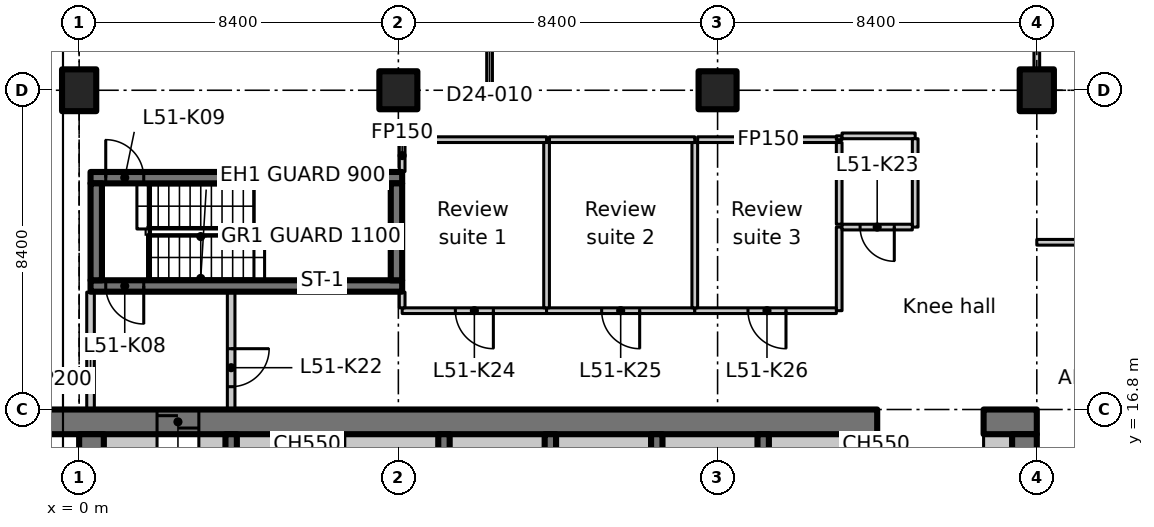
"""IFC4 building model, lengths in metres.
Left out: names, types, materials, properties, quantities, classifications, styles, units other than length and angle.
Written with IfcOpenShell. Run it as: python <this file> out.ifc"""

import sys

from ifc_helpers import new_model, si_unit, direction, frame, frame_2d, origin, origin_2d, place, context, subcontext, project, spatial, polyline, rectangle, outline, extrude, element, fill, save


model = new_model("IFC4")
c1 = context("Model", 3, precision=1e-05, world=origin(), true_north=direction((0.0, 1.0)))
c2 = subcontext(c1, "Body", "Model", "MODEL_VIEW")
j1 = project(units=[si_unit("LENGTHUNIT", "METRE"), si_unit("PLANEANGLEUNIT", "RADIAN")], contexts=[c1])
p1 = place(None, origin())
s1 = spatial("IfcSite", under=j1, at=p1, CompositionType="ELEMENT")
p2 = place(p1, origin())
s2 = spatial("IfcBuilding", under=s1, at=p2, CompositionType="ELEMENT")
p3 = place(p2, frame((0.0, 0.0, 202.8)))
s3 = spatial("IfcBuildingStorey", under=s2, at=p3, CompositionType="ELEMENT", Elevation=202.8)
p4 = place(p3, frame((0.0, 25.2, 0.0), z_axis=(0.0, 0.0, 1.0), x_axis=(1.0, 0.0, 0.0)))
e1 = element("IfcColumn", 1, at=p4, inside=s3, PredefinedType="COLUMN", context=c2, shape_type="SweptSolid", body=[
    extrude(rectangle(XDim=0.9, YDim=1.1, at=origin_2d()), origin(), (0.0, 0.0, 1.0), 3.3),
])
for number, where, z_axis, x_axis in (
    (2, (8.4, 25.2, 0.0), (0.0, 0.0, 1.0), (1.0, 0.0, 0.0)),
    (3, (16.8, 25.2, 0.0), (0.0, 0.0, 1.0), (1.0, 0.0, 0.0)),
):
    element("IfcColumn", number, at=place(p3, frame(where, z_axis=z_axis, x_axis=x_axis)), inside=s3, PredefinedType="COLUMN", context=c2, shape_type="SweptSolid", body=[
        extrude(rectangle(XDim=1.0, YDim=1.0, at=origin_2d()), origin(), (0.0, 0.0, 1.0), 3.3),
    ])
p5 = place(p3, frame((25.2, 25.2, 0.0), z_axis=(0.0, 0.0, 1.0), x_axis=(1.0, 0.0, 0.0)))
e4 = element("IfcColumn", 4, at=p5, inside=s3, PredefinedType="COLUMN", context=c2, shape_type="SweptSolid", body=[
    extrude(rectangle(XDim=0.9, YDim=1.1, at=origin_2d()), origin(), (0.0, 0.0, 1.0), 3.3),
])
p6 = place(p3, frame((-1.1, 16.475, 0.0), z_axis=(0.0, 0.0, 1.0), x_axis=(1.0, 0.0, 0.0)))
e5 = element("IfcWall", 5, at=p6, inside=s3, PredefinedType="SHEAR", context=c2, shape_type="SweptSolid", body=[
    extrude(rectangle(XDim=22.1, YDim=0.65, at=frame_2d((11.05, 0.0))), origin(), (0.0, 0.0, 1.0), 3.3),
])
p7 = place(p6, frame((3.15, 0.0, 0.0)))
e6 = element("IfcOpeningElement", 6, at=p7, cuts=e5, PredefinedType="OPENING", context=c2, shape_type="SweptSolid", body=[
    extrude(rectangle(XDim=1.1, YDim=2.3, at=frame_2d((0.55, 1.15))), frame((0.0, 0.335, 0.0), z_axis=(0.0, -1.0, 0.0), x_axis=(1.0, 0.0, 0.0)), (0.0, 0.0, 1.0), 0.67),
])
p8 = place(p3, frame((23.8, 16.475, 0.0), z_axis=(0.0, 0.0, 1.0), x_axis=(1.0, 0.0, 0.0)))
e7 = element("IfcWall", 7, at=p8, inside=s3, PredefinedType="SHEAR", context=c2, shape_type="SweptSolid", body=[
    extrude(rectangle(XDim=1.4, YDim=0.65, at=frame_2d((0.7, 0.0))), origin(), (0.0, 0.0, 1.0), 3.3),
])
p9 = place(p3, frame((0.325, 7.286, 0.0), z_axis=(0.0, 0.0, 1.0), x_axis=(0.0, 1.0, 0.0)))
e8 = element("IfcWall", 8, at=p9, inside=s3, PredefinedType="SHEAR", context=c2, shape_type="SweptSolid", body=[
    extrude(rectangle(XDim=8.864, YDim=0.65, at=frame_2d((4.432, 0.0))), origin(), (0.0, 0.0, 1.0), 3.3),
])
p10 = place(p3, frame((24.875, 12.6, 0.0), z_axis=(0.0, 0.0, 1.0), x_axis=(0.0, 1.0, 0.0)))
e9 = element("IfcWall", 9, at=p10, inside=s3, PredefinedType="SHEAR", context=c2, shape_type="SweptSolid", body=[
    extrude(rectangle(XDim=3.55, YDim=0.65, at=frame_2d((1.775, 0.0))), origin(), (0.0, 0.0, 1.0), 3.3),
])
p11 = place(p3, frame((0.65, 15.875, 0.0), z_axis=(0.0, 0.0, 1.0), x_axis=(1.0, 0.0, 0.0)))
e10 = element("IfcWall", 10, at=p11, inside=s3, PredefinedType="PARTITIONING", context=c2, shape_type="SweptSolid", body=[
    extrude(rectangle(XDim=1.4, YDim=0.55, at=frame_2d((0.7, 0.0))), origin(), (0.0, 0.0, 1.0), 3.3),
])
p12 = place(p3, frame((23.8, 15.875, 0.0), z_axis=(0.0, 0.0, 1.0), x_axis=(1.0, 0.0, 0.0)))
e11 = element("IfcWall", 11, at=p12, inside=s3, PredefinedType="PARTITIONING", context=c2, shape_type="SweptSolid", body=[
    extrude(rectangle(XDim=0.75, YDim=0.55, at=frame_2d((0.375, 0.0))), origin(), (0.0, 0.0, 1.0), 3.3),
])
for number, where, z_axis, x_axis in (
    (12, (4.0, 12.95, 0.0), (0.0, 0.0, 1.0), (0.0, 1.0, 0.0)),
    (13, (6.8, 12.95, 0.0), (0.0, 0.0, 1.0), (0.0, 1.0, 0.0)),
    (14, (9.6, 12.95, 0.0), (0.0, 0.0, 1.0), (0.0, 1.0, 0.0)),
    (15, (12.4, 12.95, 0.0), (0.0, 0.0, 1.0), (0.0, 1.0, 0.0)),
    (16, (15.2, 12.95, 0.0), (0.0, 0.0, 1.0), (0.0, 1.0, 0.0)),
    (17, (18.0, 12.95, 0.0), (0.0, 0.0, 1.0), (0.0, 1.0, 0.0)),
    (18, (20.8, 12.95, 0.0), (0.0, 0.0, 1.0), (0.0, 1.0, 0.0)),
):
    element("IfcWall", number, at=place(p3, frame(where, z_axis=z_axis, x_axis=x_axis)), inside=s3, PredefinedType="SHEAR", context=c2, shape_type="SweptSolid", body=[
        extrude(rectangle(XDim=3.2, YDim=0.3, at=frame_2d((1.6, 0.0))), origin(), (0.0, 0.0, 1.0), 3.3),
    ])
p13 = place(p3, frame((8.5, 20.05, 0.0), z_axis=(0.0, 0.0, 1.0), x_axis=(-1.0, 0.0, 0.0)))
e19 = element("IfcWall", 19, at=p13, inside=s3, PredefinedType="SHEAR", context=c2, shape_type="SweptSolid", body=[
    extrude(rectangle(XDim=8.2, YDim=0.3, at=frame_2d((4.1, 0.0))), origin(), (0.0, 0.0, 1.0), 3.3),
])
p14 = place(p13, frame((6.8, 0.0, 0.0)))
e20 = element("IfcOpeningElement", 20, at=p14, cuts=e19, PredefinedType="OPENING", context=c2, shape_type="SweptSolid", body=[
    extrude(rectangle(XDim=1.0, YDim=2.1, at=frame_2d((0.5, 1.05))), frame((0.0, 0.16, 0.0), z_axis=(0.0, -1.0, 0.0), x_axis=(1.0, 0.0, 0.0)), (0.0, 0.0, 1.0), 0.32),
])
p15 = place(p3, frame((0.3, 22.9, 0.0), z_axis=(0.0, 0.0, 1.0), x_axis=(1.0, 0.0, 0.0)))
e21 = element("IfcWall", 21, at=p15, inside=s3, PredefinedType="SHEAR", context=c2, shape_type="SweptSolid", body=[
    extrude(rectangle(XDim=8.2, YDim=0.3, at=frame_2d((4.1, 0.0))), origin(), (0.0, 0.0, 1.0), 3.3),
])
p16 = place(p15, frame((0.4, 0.0, 0.0)))
e22 = element("IfcOpeningElement", 22, at=p16, cuts=e21, PredefinedType="OPENING", context=c2, shape_type="SweptSolid", body=[
    extrude(rectangle(XDim=1.0, YDim=2.1, at=frame_2d((0.5, 1.05))), frame((0.0, 0.16, 0.0), z_axis=(0.0, -1.0, 0.0), x_axis=(1.0, 0.0, 0.0)), (0.0, 0.0, 1.0), 0.32),
])
for number, where, z_axis, x_axis in (
    (23, (0.45, 20.2, 0.0), (0.0, 0.0, 1.0), (0.0, 1.0, 0.0)),
    (24, (8.35, 20.2, 0.0), (0.0, 0.0, 1.0), (0.0, 1.0, 0.0)),
):
    element("IfcWall", number, at=place(p3, frame(where, z_axis=z_axis, x_axis=x_axis)), inside=s3, PredefinedType="SHEAR", context=c2, shape_type="SweptSolid", body=[
        extrude(rectangle(XDim=2.55, YDim=0.3, at=frame_2d((1.275, 0.0))), origin(), (0.0, 0.0, 1.0), 3.3),
    ])
p17 = place(p3, frame((0.3, 16.812, 0.0), z_axis=(0.0, 0.0, 1.0), x_axis=(0.0, 1.0, 0.0)))
e25 = element("IfcWall", 25, at=p17, inside=s3, PredefinedType="PARTITIONING", context=c2, shape_type="SweptSolid", body=[
    extrude(rectangle(XDim=3.076, YDim=0.2, at=frame_2d((1.538, 0.0))), origin(), (0.0, 0.0, 1.0), 2.93),
])
p18 = place(p3, frame((4.0, 19.888, 0.0), z_axis=(0.0, 0.0, 1.0), x_axis=(0.0, -1.0, 0.0)))
e26 = element("IfcWall", 26, at=p18, inside=s3, PredefinedType="PARTITIONING", context=c2, shape_type="SweptSolid", body=[
    extrude(rectangle(XDim=3.076, YDim=0.2, at=frame_2d((1.538, 0.0))), origin(), (0.0, 0.0, 1.0), 3.3),
])
p19 = place(p18, frame((1.488, 0.0, 0.0)))
e27 = element("IfcOpeningElement", 27, at=p19, cuts=e26, PredefinedType="OPENING", context=c2, shape_type="SweptSolid", body=[
    extrude(rectangle(XDim=1.0, YDim=2.1, at=frame_2d((0.5, 1.05))), frame((0.0, 0.11, 0.0), z_axis=(0.0, -1.0, 0.0), x_axis=(1.0, 0.0, 0.0)), (0.0, 0.0, 1.0), 0.22),
])
p20 = place(p3, frame((12.3, 19.4, 0.0), z_axis=(0.0, 0.0, 1.0), x_axis=(-1.0, 0.0, 0.0)))
e28 = element("IfcWall", 28, at=p20, inside=s3, PredefinedType="PARTITIONING", context=c2, shape_type="SweptSolid", body=[
    extrude(rectangle(XDim=3.8, YDim=0.15, at=frame_2d((1.9, 0.0))), origin(), (0.0, 0.0, 1.0), 3.3),
])
p21 = place(p20, frame((1.4, 0.0, 0.0)))
e29 = element("IfcOpeningElement", 29, at=p21, cuts=e28, PredefinedType="OPENING", context=c2, shape_type="SweptSolid", body=[
    extrude(rectangle(XDim=1.0, YDim=2.1, at=frame_2d((0.5, 1.05))), frame((0.0, 0.085, 0.0), z_axis=(0.0, -1.0, 0.0), x_axis=(1.0, 0.0, 0.0)), (0.0, 0.0, 1.0), 0.17),
])
p22 = place(p3, frame((8.5, 19.475, 0.0), z_axis=(0.0, 0.0, 1.0), x_axis=(0.0, 1.0, 0.0)))
e30 = element("IfcWall", 30, at=p22, inside=s3, PredefinedType="PARTITIONING", context=c2, shape_type="SweptSolid", body=[
    extrude(rectangle(XDim=0.413, YDim=0.15, at=frame_2d((0.207, 0.0))), origin(), (0.0, 0.0, 1.0), 3.3),
])
p23 = place(p3, frame((8.5, 23.062, 0.0), z_axis=(0.0, 0.0, 1.0), x_axis=(0.0, 1.0, 0.0)))
e31 = element("IfcWall", 31, at=p23, inside=s3, PredefinedType="PARTITIONING", context=c2, shape_type="SweptSolid", body=[
    extrude(rectangle(XDim=0.838, YDim=0.15, at=frame_2d((0.419, 0.0))), origin(), (0.0, 0.0, 1.0), 3.3),
])
p24 = place(p3, frame((8.575, 23.9, 0.0), z_axis=(0.0, 0.0, 1.0), x_axis=(1.0, 0.0, 0.0)))
e32 = element("IfcWall", 32, at=p24, inside=s3, PredefinedType="PARTITIONING", context=c2, shape_type="SweptSolid", body=[
    extrude(rectangle(XDim=3.725, YDim=0.15, at=frame_2d((1.863, 0.0))), origin(), (0.0, 0.0, 1.0), 3.3),
])
p25 = place(p3, frame((16.2, 19.4, 0.0), z_axis=(0.0, 0.0, 1.0), x_axis=(-1.0, 0.0, 0.0)))
e33 = element("IfcWall", 33, at=p25, inside=s3, PredefinedType="PARTITIONING", context=c2, shape_type="SweptSolid", body=[
    extrude(rectangle(XDim=3.9, YDim=0.15, at=frame_2d((1.95, 0.0))), origin(), (0.0, 0.0, 1.0), 3.3),
])
p26 = place(p25, frame((1.45, 0.0, 0.0)))
e34 = element("IfcOpeningElement", 34, at=p26, cuts=e33, PredefinedType="OPENING", context=c2, shape_type="SweptSolid", body=[
    extrude(rectangle(XDim=1.0, YDim=2.1, at=frame_2d((0.5, 1.05))), frame((0.0, 0.085, 0.0), z_axis=(0.0, -1.0, 0.0), x_axis=(1.0, 0.0, 0.0)), (0.0, 0.0, 1.0), 0.17),
])
p27 = place(p3, frame((12.3, 23.825, 0.0), z_axis=(0.0, 0.0, 1.0), x_axis=(0.0, -1.0, 0.0)))
e35 = element("IfcWall", 35, at=p27, inside=s3, PredefinedType="PARTITIONING", context=c2, shape_type="SweptSolid", body=[
    extrude(rectangle(XDim=4.35, YDim=0.15, at=frame_2d((2.175, 0.0))), origin(), (0.0, 0.0, 1.0), 3.3),
])
p28 = place(p3, frame((12.375, 23.9, 0.0), z_axis=(0.0, 0.0, 1.0), x_axis=(1.0, 0.0, 0.0)))
e36 = element("IfcWall", 36, at=p28, inside=s3, PredefinedType="PARTITIONING", context=c2, shape_type="SweptSolid", body=[
    extrude(rectangle(XDim=3.825, YDim=0.15, at=frame_2d((1.913, 0.0))), origin(), (0.0, 0.0, 1.0), 3.3),
])
p29 = place(p3, frame((20.0, 21.6, 0.0), z_axis=(0.0, 0.0, 1.0), x_axis=(0.0, -1.0, 0.0)))
e37 = element("IfcWall", 37, at=p29, inside=s3, PredefinedType="PARTITIONING", context=c2, shape_type="SweptSolid", body=[
    extrude(rectangle(XDim=2.2, YDim=0.15, at=frame_2d((1.1, 0.0))), origin(), (0.0, 0.0, 1.0), 3.3),
])
p30 = place(p3, frame((19.925, 19.4, 0.0), z_axis=(0.0, 0.0, 1.0), x_axis=(-1.0, 0.0, 0.0)))
e38 = element("IfcWall", 38, at=p30, inside=s3, PredefinedType="PARTITIONING", context=c2, shape_type="SweptSolid", body=[
    extrude(rectangle(XDim=3.725, YDim=0.15, at=frame_2d((1.863, 0.0))), origin(), (0.0, 0.0, 1.0), 3.3),
])
p31 = place(p30, frame((1.325, 0.0, 0.0)))
e39 = element("IfcOpeningElement", 39, at=p31, cuts=e38, PredefinedType="OPENING", context=c2, shape_type="SweptSolid", body=[
    extrude(rectangle(XDim=1.0, YDim=2.1, at=frame_2d((0.5, 1.05))), frame((0.0, 0.085, 0.0), z_axis=(0.0, -1.0, 0.0), x_axis=(1.0, 0.0, 0.0)), (0.0, 0.0, 1.0), 0.17),
])
p32 = place(p3, frame((16.2, 23.825, 0.0), z_axis=(0.0, 0.0, 1.0), x_axis=(0.0, -1.0, 0.0)))
e40 = element("IfcWall", 40, at=p32, inside=s3, PredefinedType="PARTITIONING", context=c2, shape_type="SweptSolid", body=[
    extrude(rectangle(XDim=4.35, YDim=0.15, at=frame_2d((2.175, 0.0))), origin(), (0.0, 0.0, 1.0), 3.3),
])
p33 = place(p3, frame((16.275, 23.9, 0.0), z_axis=(0.0, 0.0, 1.0), x_axis=(1.0, 0.0, 0.0)))
e41 = element("IfcWall", 41, at=p33, inside=s3, PredefinedType="PARTITIONING", context=c2, shape_type="SweptSolid", body=[
    extrude(rectangle(XDim=3.725, YDim=0.15, at=frame_2d((1.863, 0.0))), origin(), (0.0, 0.0, 1.0), 3.3),
])
p34 = place(p3, frame((20.0, 23.9, 0.0), z_axis=(0.0, 0.0, 1.0), x_axis=(0.0, 1.0, 0.0)))
e42 = element("IfcWall", 42, at=p34, inside=s3, PredefinedType="PARTITIONING", context=c2, shape_type="SweptSolid", body=[
    extrude(rectangle(XDim=0.1, YDim=0.15, at=frame_2d((0.05, 0.0))), origin(), (0.0, 0.0, 1.0), 3.3),
])
p35 = place(p3, frame((20.075, 24.0, 0.0), z_axis=(0.0, 0.0, 1.0), x_axis=(1.0, 0.0, 0.0)))
e43 = element("IfcWall", 43, at=p35, inside=s3, PredefinedType="PARTITIONING", context=c2, shape_type="SweptSolid", body=[
    extrude(rectangle(XDim=1.925, YDim=0.15, at=frame_2d((0.962, 0.0))), origin(), (0.0, 0.0, 1.0), 3.3),
])
p36 = place(p3, frame((22.0, 23.925, 0.0), z_axis=(0.0, 0.0, 1.0), x_axis=(0.0, -1.0, 0.0)))
e44 = element("IfcWall", 44, at=p36, inside=s3, PredefinedType="PARTITIONING", context=c2, shape_type="SweptSolid", body=[
    extrude(rectangle(XDim=2.325, YDim=0.15, at=frame_2d((1.163, 0.0))), origin(), (0.0, 0.0, 1.0), 3.3),
])
p37 = place(p3, frame((21.925, 21.6, 0.0), z_axis=(0.0, 0.0, 1.0), x_axis=(-1.0, 0.0, 0.0)))
e45 = element("IfcWall", 45, at=p37, inside=s3, PredefinedType="PARTITIONING", context=c2, shape_type="SweptSolid", body=[
    extrude(rectangle(XDim=1.85, YDim=0.15, at=frame_2d((0.925, 0.0))), origin(), (0.0, 0.0, 1.0), 3.3),
])
p38 = place(p37, frame((0.475, 0.0, 0.0)))
e46 = element("IfcOpeningElement", 46, at=p38, cuts=e45, PredefinedType="OPENING", context=c2, shape_type="SweptSolid", body=[
    extrude(rectangle(XDim=0.9, YDim=2.1, at=frame_2d((0.45, 1.05))), frame((0.0, 0.085, 0.0), z_axis=(0.0, -1.0, 0.0), x_axis=(1.0, 0.0, 0.0)), (0.0, 0.0, 1.0), 0.17),
])
p39 = place(p3, frame((20.0, 21.675, 0.0), z_axis=(0.0, 0.0, 1.0), x_axis=(0.0, 1.0, 0.0)))
e47 = element("IfcWall", 47, at=p39, inside=s3, PredefinedType="PARTITIONING", context=c2, shape_type="SweptSolid", body=[
    extrude(rectangle(XDim=2.15, YDim=0.15, at=frame_2d((1.075, 0.0))), origin(), (0.0, 0.0, 1.0), 3.3),
])
p40 = place(p3, frame((3.15, 15.875, 0.0), z_axis=(0.0, 0.0, 1.0), x_axis=(1.0, 0.0, 0.0)))
e48 = element("IfcWall", 48, at=p40, inside=s3, PredefinedType="PARTITIONING", context=c2, shape_type="SweptSolid", body=[
    extrude(rectangle(XDim=0.7, YDim=0.55, at=frame_2d((0.35, 0.0))), origin(), (0.0, 0.0, 1.0), 3.3),
])
for number, where, z_axis, x_axis in (
    (49, (4.15, 15.875, 0.0), (0.0, 0.0, 1.0), (1.0, 0.0, 0.0)),
    (50, (6.95, 15.875, 0.0), (0.0, 0.0, 1.0), (1.0, 0.0, 0.0)),
    (51, (9.75, 15.875, 0.0), (0.0, 0.0, 1.0), (1.0, 0.0, 0.0)),
    (52, (12.55, 15.875, 0.0), (0.0, 0.0, 1.0), (1.0, 0.0, 0.0)),
    (53, (15.35, 15.875, 0.0), (0.0, 0.0, 1.0), (1.0, 0.0, 0.0)),
    (54, (18.15, 15.875, 0.0), (0.0, 0.0, 1.0), (1.0, 0.0, 0.0)),
):
    element("IfcWall", number, at=place(p3, frame(where, z_axis=z_axis, x_axis=x_axis)), inside=s3, PredefinedType="PARTITIONING", context=c2, shape_type="SweptSolid", body=[
        extrude(rectangle(XDim=2.5, YDim=0.55, at=frame_2d((1.25, 0.0))), origin(), (0.0, 0.0, 1.0), 3.3),
    ])
p41 = place(p3, frame((20.95, 15.875, 0.0), z_axis=(0.0, 0.0, 1.0), x_axis=(1.0, 0.0, 0.0)))
e55 = element("IfcWall", 55, at=p41, inside=s3, PredefinedType="PARTITIONING", context=c2, shape_type="SweptSolid", body=[
    extrude(rectangle(XDim=0.05, YDim=0.55, at=frame_2d((0.025, 0.0))), origin(), (0.0, 0.0, 1.0), 3.3),
])
p42 = place(p3, frame((25.2, 21.2, 0.0), z_axis=(0.0, 0.0, 1.0), x_axis=(1.0, 0.0, 0.0)))
e56 = element("IfcWall", 56, at=p42, inside=s3, PredefinedType="PARTITIONING", context=c2, shape_type="SweptSolid", body=[
    extrude(rectangle(XDim=4.2, YDim=0.15, at=frame_2d((2.1, 0.0))), origin(), (0.0, 0.0, 1.0), 3.28),
])
p43 = place(p3, frame((25.2, 31.0, 0.0), z_axis=(0.0, 0.0, 1.0), x_axis=(0.0, -1.0, 0.0)))
e57 = element("IfcWall", 57, at=p43, inside=s3, PredefinedType="PARTITIONING", context=c2, shape_type="SweptSolid", body=[
    extrude(outline(polyline([(0.0, 0.0), (5.23, 0.0), (5.23, 2.93), (0.0, 2.93), (0.0, 0.0)])), frame((0.0, 0.075, 0.0), z_axis=(0.0, -1.0, 0.0), x_axis=(1.0, 0.0, 0.0)), (0.0, 0.0, 1.0), 0.15),
])
p44 = place(p43, frame((2.03, 0.0, 0.0)))
e58 = element("IfcOpeningElement", 58, at=p44, cuts=e57, PredefinedType="OPENING", context=c2, shape_type="SweptSolid", body=[
    extrude(rectangle(XDim=1.1, YDim=2.1, at=frame_2d((0.55, 1.05))), frame((0.0, 0.085, 0.0), z_axis=(0.0, -1.0, 0.0), x_axis=(1.0, 0.0, 0.0)), (0.0, 0.0, 1.0), 0.17),
])
p45 = place(p3, frame((10.8, 25.2, 0.0), z_axis=(0.0, 0.0, 1.0), x_axis=(0.0, 1.0, 0.0)))
e59 = element("IfcWall", 59, at=p45, inside=s3, PredefinedType="PARTITIONING", context=c2, shape_type="SweptSolid", body=[
    extrude(rectangle(XDim=4.2, YDim=0.15, at=frame_2d((2.1, 0.0))), origin(), (0.0, 0.0, 1.0), 3.28),
])
p46 = place(p45, frame((1.5, 0.0, 0.0)))
e60 = element("IfcOpeningElement", 60, at=p46, cuts=e59, PredefinedType="OPENING", context=c2, shape_type="SweptSolid", body=[
    extrude(rectangle(XDim=1.1, YDim=2.1, at=frame_2d((0.55, 1.05))), frame((0.0, 0.085, 0.0), z_axis=(0.0, -1.0, 0.0), x_axis=(1.0, 0.0, 0.0)), (0.0, 0.0, 1.0), 0.17),
])
p47 = place(p7, origin())
e61 = element("IfcDoor", 61, at=p47, inside=s3, OperationType="SLIDING_TO_LEFT", PredefinedType="DOOR", context=c2, shape_type="SweptSolid", body=[
    extrude(rectangle(XDim=1.1, YDim=2.3, at=frame_2d((0.55, 1.15))), frame((0.0, 0.025, 0.0), z_axis=(0.0, -1.0, 0.0), x_axis=(1.0, 0.0, 0.0)), (0.0, 0.0, 1.0), 0.05),
])
fill(e6, e61)
p48 = place(p14, origin())
e62 = element("IfcDoor", 62, at=p48, inside=s3, OperationType="SINGLE_SWING_RIGHT", PredefinedType="DOOR", context=c2, shape_type="SweptSolid", body=[
    extrude(rectangle(XDim=1.0, YDim=2.1, at=frame_2d((0.5, 1.05))), frame((0.0, 0.025, 0.0), z_axis=(0.0, -1.0, 0.0), x_axis=(1.0, 0.0, 0.0)), (0.0, 0.0, 1.0), 0.05),
])
fill(e20, e62)
p49 = place(p16, origin())
e63 = element("IfcDoor", 63, at=p49, inside=s3, OperationType="SINGLE_SWING_LEFT", PredefinedType="DOOR", context=c2, shape_type="SweptSolid", body=[
    extrude(rectangle(XDim=1.0, YDim=2.1, at=frame_2d((0.5, 1.05))), frame((0.0, 0.025, 0.0), z_axis=(0.0, -1.0, 0.0), x_axis=(1.0, 0.0, 0.0)), (0.0, 0.0, 1.0), 0.05),
])
fill(e22, e63)
p50 = place(p19, origin())
e64 = element("IfcDoor", 64, at=p50, inside=s3, OperationType="SINGLE_SWING_RIGHT", PredefinedType="DOOR", context=c2, shape_type="SweptSolid", body=[
    extrude(rectangle(XDim=1.0, YDim=2.1, at=frame_2d((0.5, 1.05))), frame((0.0, 0.025, 0.0), z_axis=(0.0, -1.0, 0.0), x_axis=(1.0, 0.0, 0.0)), (0.0, 0.0, 1.0), 0.05),
])
fill(e27, e64)
p51 = place(p38, origin())
e65 = element("IfcDoor", 65, at=p51, inside=s3, OperationType="SINGLE_SWING_LEFT", PredefinedType="DOOR", context=c2, shape_type="SweptSolid", body=[
    extrude(rectangle(XDim=0.9, YDim=2.1, at=frame_2d((0.45, 1.05))), frame((0.0, 0.025, 0.0), z_axis=(0.0, -1.0, 0.0), x_axis=(1.0, 0.0, 0.0)), (0.0, 0.0, 1.0), 0.05),
])
fill(e46, e65)
p52 = place(p21, origin())
e66 = element("IfcDoor", 66, at=p52, inside=s3, OperationType="SINGLE_SWING_RIGHT", PredefinedType="DOOR", context=c2, shape_type="SweptSolid", body=[
    extrude(rectangle(XDim=1.0, YDim=2.1, at=frame_2d((0.5, 1.05))), frame((0.0, 0.025, 0.0), z_axis=(0.0, -1.0, 0.0), x_axis=(1.0, 0.0, 0.0)), (0.0, 0.0, 1.0), 0.05),
])
fill(e29, e66)
p53 = place(p26, origin())
e67 = element("IfcDoor", 67, at=p53, inside=s3, OperationType="SINGLE_SWING_LEFT", PredefinedType="DOOR", context=c2, shape_type="SweptSolid", body=[
    extrude(rectangle(XDim=1.0, YDim=2.1, at=frame_2d((0.5, 1.05))), frame((0.0, 0.025, 0.0), z_axis=(0.0, -1.0, 0.0), x_axis=(1.0, 0.0, 0.0)), (0.0, 0.0, 1.0), 0.05),
])
fill(e34, e67)
p54 = place(p31, origin())
e68 = element("IfcDoor", 68, at=p54, inside=s3, OperationType="SINGLE_SWING_RIGHT", PredefinedType="DOOR", context=c2, shape_type="SweptSolid", body=[
    extrude(rectangle(XDim=1.0, YDim=2.1, at=frame_2d((0.5, 1.05))), frame((0.0, 0.025, 0.0), z_axis=(0.0, -1.0, 0.0), x_axis=(1.0, 0.0, 0.0)), (0.0, 0.0, 1.0), 0.05),
])
fill(e39, e68)
save(model, sys.argv[1])
